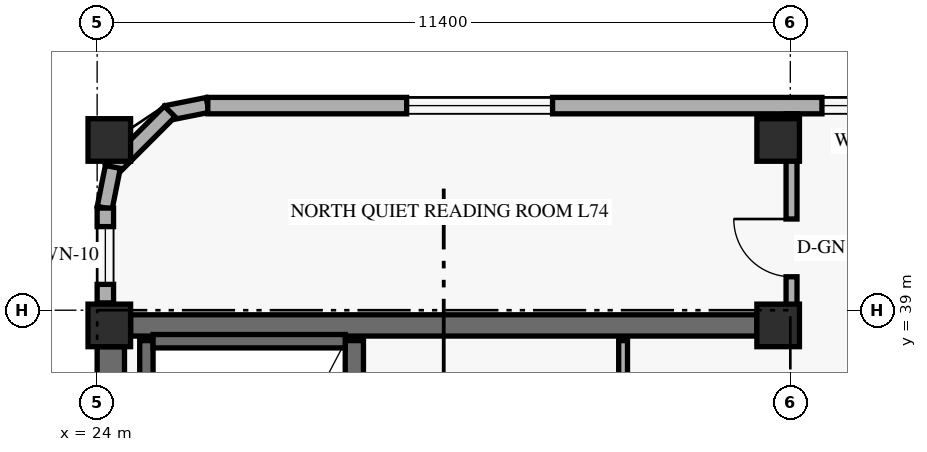
"""IFC4 building model, lengths in metres.
Left out: names, types, materials, properties, quantities, classifications, styles, units other than length and angle.
Written with IfcOpenShell. Run it as: python <this file> out.ifc"""

import sys

from ifc_helpers import new_model, si_unit, direction, frame, frame_2d, origin, origin_2d, place, context, subcontext, project, spatial, rectangle, extrude, element, fill, save


model = new_model("IFC4")
c1 = context("Model", 3, precision=1e-05, world=origin(), true_north=direction((0.0, 1.0)))
c2 = subcontext(c1, "Body", "Model", "MODEL_VIEW")
j1 = project(units=[si_unit("LENGTHUNIT", "METRE"), si_unit("PLANEANGLEUNIT", "RADIAN")], contexts=[c1])
p1 = place(None, origin())
s1 = spatial("IfcSite", under=j1, at=p1, CompositionType="ELEMENT")
p2 = place(p1, origin())
s2 = spatial("IfcBuilding", under=s1, at=p2, CompositionType="ELEMENT")
p3 = place(p2, frame((0.0, 0.0, 282.0)))
s3 = spatial("IfcBuildingStorey", under=s2, at=p3, CompositionType="ELEMENT", Elevation=282.0)
p4 = place(p3, frame((24.225, 30.55, 0.0), z_axis=(0.0, 0.0, 1.0), x_axis=(0.0, 1.0, 0.0)))
e1 = element("IfcWall", 1, at=p4, inside=s3, PredefinedType="SHEAR", context=c2, shape_type="SweptSolid", body=[
    extrude(rectangle(XDim=7.85, YDim=0.45, at=frame_2d((3.925, 0.0))), origin(), (0.0, 0.0, 1.0), 4.161),
])
p5 = place(p3, frame((24.55, 38.75, 0.0), z_axis=(0.0, 0.0, 1.0), x_axis=(1.0, 0.0, 0.0)))
e2 = element("IfcWall", 2, at=p5, inside=s3, PredefinedType="SHEAR", context=c2, shape_type="SweptSolid", body=[
    extrude(rectangle(XDim=10.3, YDim=0.35, at=frame_2d((5.15, 0.0))), origin(), (0.0, 0.0, 1.0), 4.7),
])
p6 = place(p3, frame((24.81, 30.74, 0.0), z_axis=(0.0, 0.0, 1.0), x_axis=(0.0, 1.0, 0.0)))
e3 = element("IfcWall", 3, at=p6, inside=s3, PredefinedType="SHEAR", context=c2, shape_type="SweptSolid", body=[
    extrude(rectangle(XDim=7.76, YDim=0.22, at=frame_2d((3.88, 0.0))), origin(), (0.0, 0.0, 1.0), 4.7),
])
p7 = place(p3, frame((28.23, 30.74, 0.0), z_axis=(0.0, 0.0, 1.0), x_axis=(0.0, 1.0, 0.0)))
e4 = element("IfcWall", 4, at=p7, inside=s3, PredefinedType="SHEAR", context=c2, shape_type="SweptSolid", body=[
    extrude(rectangle(XDim=7.76, YDim=0.3, at=frame_2d((3.88, 0.0))), origin(), (0.0, 0.0, 1.0), 4.7),
])
p8 = place(p3, frame((24.92, 38.49, 0.0), z_axis=(0.0, 0.0, 1.0), x_axis=(1.0, 0.0, 0.0)))
e5 = element("IfcWall", 5, at=p8, inside=s3, PredefinedType="SHEAR", context=c2, shape_type="SweptSolid", body=[
    extrude(rectangle(XDim=3.16, YDim=0.22, at=frame_2d((1.58, 0.0))), origin(), (0.0, 0.0, 1.0), 4.7),
])
for number, where, z_axis, x_axis in (
    (6, (24.2, 38.75, 0.0), (0.0, 0.0, 1.0), (1.0, 0.0, 0.0)),
    (7, (24.2, 41.8, 0.0), (0.0, 0.0, 1.0), (1.0, 0.0, 0.0)),
    (8, (35.2, 38.75, 0.0), (0.0, 0.0, 1.0), (1.0, 0.0, 0.0)),
    (9, (35.2, 41.8, 0.0), (0.0, 0.0, 1.0), (1.0, 0.0, 0.0)),
):
    element("IfcColumn", number, at=place(p3, frame(where, z_axis=z_axis, x_axis=x_axis)), inside=s3, PredefinedType="COLUMN", context=c2, shape_type="SweptSolid", body=[
        extrude(rectangle(XDim=0.7, YDim=0.7, at=origin_2d()), origin(), (0.0, 0.0, 1.0), 5.0),
    ])
p9 = place(p3, frame((25.816, 42.376, 0.0), z_axis=(0.0, 0.0, 1.0), x_axis=(-0.980812594069, -0.194952956674, 0.0)))
e10 = element("IfcWall", 10, at=p9, inside=s3, PredefinedType="SOLIDWALL", context=c2, shape_type="SweptSolid", body=[
    extrude(rectangle(XDim=0.686, YDim=0.25, at=frame_2d((0.343, 0.0))), origin(), (0.0, 0.0, 1.0), 4.7),
])
p10 = place(p3, frame((25.194, 42.269, 0.0), z_axis=(0.0, 0.0, 1.0), x_axis=(-0.707106781187, -0.707106781187, 0.0)))
e11 = element("IfcWall", 11, at=p10, inside=s3, PredefinedType="SOLIDWALL", context=c2, shape_type="SweptSolid", body=[
    extrude(rectangle(XDim=1.362, YDim=0.25, at=frame_2d((0.681, 0.0))), origin(), (0.0, 0.0, 1.0), 4.143),
])
p11 = place(p3, frame((24.258, 41.357, 0.0), z_axis=(0.0, 0.0, 1.0), x_axis=(-0.194952956674, -0.980812594069, 0.0)))
e12 = element("IfcWall", 12, at=p11, inside=s3, PredefinedType="SOLIDWALL", context=c2, shape_type="SweptSolid", body=[
    extrude(rectangle(XDim=0.686, YDim=0.25, at=frame_2d((0.343, 0.0))), origin(), (0.0, 0.0, 1.0), 4.143),
])
p12 = place(p3, frame((58.78, 42.365, 0.0), z_axis=(0.0, 0.0, 1.0), x_axis=(-1.0, 0.0, 0.0)))
e13 = element("IfcWall", 13, at=p12, inside=s3, PredefinedType="SOLIDWALL", context=c2, shape_type="SweptSolid", body=[
    extrude(rectangle(XDim=32.96, YDim=0.27, at=frame_2d((16.48, 0.0))), origin(), (0.0, 0.0, 1.0), 4.7),
])
p13 = place(p12, frame((27.29, 0.0, 0.85)))
e14 = element("IfcOpeningElement", 14, at=p13, cuts=e13, PredefinedType="OPENING", context=c2, shape_type="SweptSolid", body=[
    extrude(rectangle(XDim=2.4, YDim=1.9, at=frame_2d((1.2, 0.95))), frame((0.0, 0.145, 0.0), z_axis=(0.0, -1.0, 0.0), x_axis=(1.0, 0.0, 0.0)), (0.0, 0.0, 1.0), 0.29),
])
p14 = place(p12, frame((21.66, 0.0, 0.85)))
e15 = element("IfcOpeningElement", 15, at=p14, cuts=e13, PredefinedType="OPENING", context=c2, shape_type="SweptSolid", body=[
    extrude(rectangle(XDim=1.2, YDim=1.5, at=frame_2d((0.6, 0.75))), frame((0.0, 0.145, 0.0), z_axis=(0.0, -1.0, 0.0), x_axis=(1.0, 0.0, 0.0)), (0.0, 0.0, 1.0), 0.29),
])
p15 = place(p12, frame((17.13, 0.0, 0.85)))
e16 = element("IfcOpeningElement", 16, at=p15, cuts=e13, PredefinedType="OPENING", context=c2, shape_type="SweptSolid", body=[
    extrude(rectangle(XDim=2.4, YDim=1.9, at=frame_2d((1.2, 0.95))), frame((0.0, 0.145, 0.0), z_axis=(0.0, -1.0, 0.0), x_axis=(1.0, 0.0, 0.0)), (0.0, 0.0, 1.0), 0.29),
])
p16 = place(p12, frame((3.054, 0.0, 0.85)))
e17 = element("IfcOpeningElement", 17, at=p16, cuts=e13, PredefinedType="OPENING", context=c2, shape_type="SweptSolid", body=[
    extrude(rectangle(XDim=2.4, YDim=1.9, at=frame_2d((1.2, 0.95))), frame((0.0, 0.145, 0.0), z_axis=(0.0, -1.0, 0.0), x_axis=(1.0, 0.0, 0.0)), (0.0, 0.0, 1.0), 0.29),
])
p17 = place(p3, frame((24.135, 39.12, 0.0), z_axis=(0.0, 0.0, 1.0), x_axis=(0.0, 1.0, 0.0)))
e18 = element("IfcWall", 18, at=p17, inside=s3, PredefinedType="SOLIDWALL", context=c2, shape_type="SweptSolid", body=[
    extrude(rectangle(XDim=1.56, YDim=0.27, at=frame_2d((0.78, 0.0))), origin(), (0.0, 0.0, 1.0), 4.143),
])
p18 = place(p17, frame((0.305, 0.0, 0.85)))
e19 = element("IfcOpeningElement", 19, at=p18, cuts=e18, PredefinedType="OPENING", context=c2, shape_type="SweptSolid", body=[
    extrude(rectangle(XDim=0.95, YDim=1.5, at=frame_2d((0.475, 0.75))), frame((0.0, 0.145, 0.0), z_axis=(0.0, -1.0, 0.0), x_axis=(1.0, 0.0, 0.0)), (0.0, 0.0, 1.0), 0.29),
])
p19 = place(p3, frame((35.42, 38.75, 0.0), z_axis=(0.0, 0.0, 1.0), x_axis=(0.0, 1.0, 0.0)))
e20 = element("IfcWall", 20, at=p19, inside=s3, PredefinedType="STANDARD", context=c2, shape_type="SweptSolid", body=[
    extrude(rectangle(XDim=3.48, YDim=0.18, at=frame_2d((1.74, 0.0))), origin(), (0.0, 0.0, 1.0), 4.143),
])
p20 = place(p19, frame((0.8, 0.0, 0.0)))
e21 = element("IfcOpeningElement", 21, at=p20, cuts=e20, PredefinedType="OPENING", context=c2, shape_type="SweptSolid", body=[
    extrude(rectangle(XDim=0.95, YDim=2.15, at=frame_2d((0.475, 1.075))), frame((0.0, 0.1, 0.0), z_axis=(0.0, -1.0, 0.0), x_axis=(1.0, 0.0, 0.0)), (0.0, 0.0, 1.0), 0.2),
])
p21 = place(p3, frame((32.65, 31.35, 0.0), z_axis=(0.0, 0.0, 1.0), x_axis=(0.0, 1.0, 0.0)))
e22 = element("IfcWall", 22, at=p21, inside=s3, PredefinedType="PARTITIONING", context=c2, shape_type="SweptSolid", body=[
    extrude(rectangle(XDim=7.15, YDim=0.145, at=frame_2d((3.575, 0.0))), origin(), (0.0, 0.0, 1.0), 4.7),
])
p22 = place(p13, origin())
e23 = element("IfcWindow", 23, at=p22, inside=s3, PartitioningType="SINGLE_PANEL", PredefinedType="WINDOW", context=c2, shape_type="SweptSolid", body=[
    extrude(rectangle(XDim=2.4, YDim=1.9, at=frame_2d((1.2, 0.95))), frame((0.0, 0.03, 0.0), z_axis=(0.0, -1.0, 0.0), x_axis=(1.0, 0.0, 0.0)), (0.0, 0.0, 1.0), 0.06),
])
fill(e14, e23)
p23 = place(p14, origin())
e24 = element("IfcWindow", 24, at=p23, inside=s3, PartitioningType="SINGLE_PANEL", PredefinedType="WINDOW", context=c2, shape_type="SweptSolid", body=[
    extrude(rectangle(XDim=1.2, YDim=1.5, at=frame_2d((0.6, 0.75))), frame((0.0, 0.03, 0.0), z_axis=(0.0, -1.0, 0.0), x_axis=(1.0, 0.0, 0.0)), (0.0, 0.0, 1.0), 0.06),
])
fill(e15, e24)
p24 = place(p18, origin())
e25 = element("IfcWindow", 25, at=p24, inside=s3, PartitioningType="SINGLE_PANEL", PredefinedType="WINDOW", context=c2, shape_type="SweptSolid", body=[
    extrude(rectangle(XDim=0.95, YDim=1.5, at=frame_2d((0.475, 0.75))), frame((0.0, 0.03, 0.0), z_axis=(0.0, -1.0, 0.0), x_axis=(1.0, 0.0, 0.0)), (0.0, 0.0, 1.0), 0.06),
])
fill(e19, e25)
p25 = place(p20, origin())
e26 = element("IfcDoor", 26, at=p25, inside=s3, OperationType="SINGLE_SWING_RIGHT", PredefinedType="DOOR", context=c2, shape_type="SweptSolid", body=[
    extrude(rectangle(XDim=0.95, YDim=2.15, at=frame_2d((0.475, 1.075))), frame((0.0, 0.025, 0.0), z_axis=(0.0, -1.0, 0.0), x_axis=(1.0, 0.0, 0.0)), (0.0, 0.0, 1.0), 0.05),
])
fill(e21, e26)
save(model, sys.argv[1])
